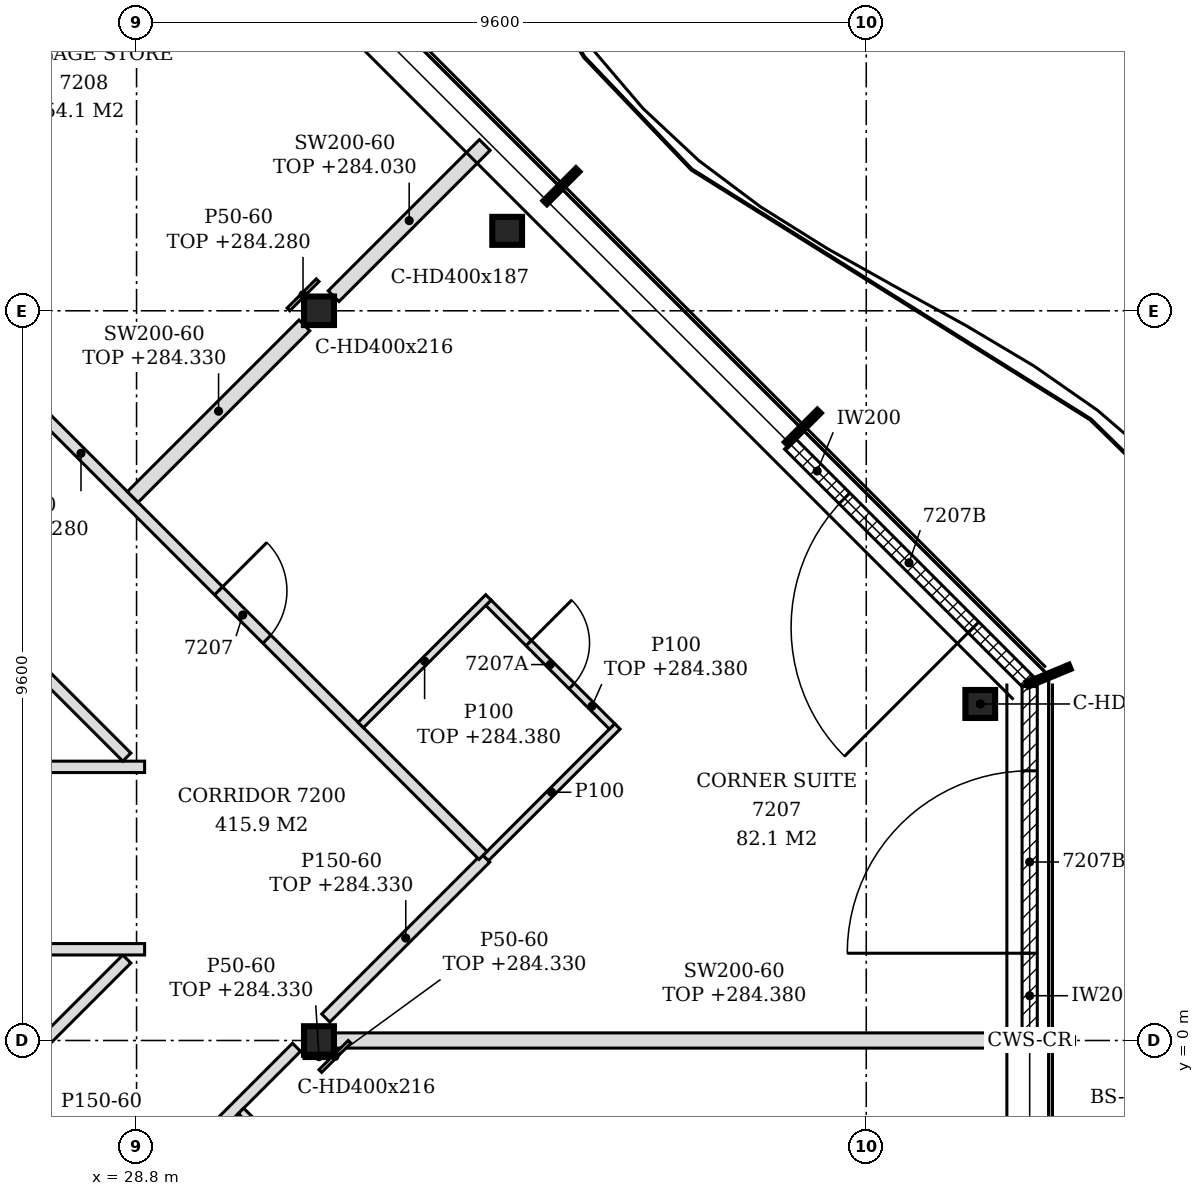
"""IFC4 building model, lengths in metres.
Left out: names, types, materials, properties, quantities, classifications, styles, units other than length and angle.
Written with IfcOpenShell. Run it as: python <this file> out.ifc"""

import sys

from ifc_helpers import new_model, si_unit, direction, frame, frame_2d, origin, origin_2d, place, context, subcontext, project, spatial, polyline, rectangle, i_section, outline, extrude, element, fill, save


model = new_model("IFC4")
c1 = context("Model", 3, precision=1e-05, world=origin(), true_north=direction((0.0, 1.0)))
c2 = subcontext(c1, "Body", "Model", "MODEL_VIEW")
j1 = project(units=[si_unit("LENGTHUNIT", "METRE"), si_unit("PLANEANGLEUNIT", "RADIAN")], contexts=[c1])
p1 = place(None, origin())
s1 = spatial("IfcSite", under=j1, at=p1, CompositionType="ELEMENT")
p2 = place(p1, origin())
s2 = spatial("IfcBuilding", under=s1, at=p2, CompositionType="ELEMENT")
p3 = place(p2, frame((0.0, 0.0, 281.4)))
s3 = spatial("IfcBuildingStorey", under=s2, at=p3, CompositionType="ELEMENT", Elevation=281.4)
for number, where, z_axis, x_axis in (
    (1, (39.9, 4.427, -0.15), (0.0, 0.0, 1.0), (1.0, 0.0, 0.0)),
    (2, (33.676, 10.652, -0.15), (0.0, 0.0, 1.0), (1.0, 0.0, 0.0)),
):
    element("IfcColumn", number, at=place(p3, frame(where, z_axis=z_axis, x_axis=x_axis)), inside=s3, PredefinedType="COLUMN", context=c2, shape_type="SweptSolid", body=[
        extrude(i_section(OverallWidth=0.391, OverallDepth=0.368, WebThickness=0.015, FlangeThickness=0.024, FilletRadius=0.015, at=origin_2d()), origin(), (0.0, 0.0, 1.0), 3.6),
    ])
for number, where, z_axis, x_axis in (
    (3, (31.2, 0.0, -0.15), (0.0, 0.0, 1.0), (1.0, 0.0, 0.0)),
    (4, (31.2, 9.6, -0.15), (0.0, 0.0, 1.0), (1.0, 0.0, 0.0)),
):
    element("IfcColumn", number, at=place(p3, frame(where, z_axis=z_axis, x_axis=x_axis)), inside=s3, PredefinedType="COLUMN", context=c2, shape_type="SweptSolid", body=[
        extrude(i_section(OverallWidth=0.394, OverallDepth=0.375, WebThickness=0.017, FlangeThickness=0.028, FilletRadius=0.015, at=origin_2d()), origin(), (0.0, 0.0, 1.0), 3.6),
    ])
p4 = place(p3, frame((40.55, 0.03, 0.0), z_axis=(0.0, 0.0, 1.0), x_axis=(0.0, 1.0, 0.0)))
e5 = element("IfcWall", 5, at=p4, inside=s3, PredefinedType="NOTDEFINED", context=c2, shape_type="SweptSolid", body=[
    extrude(rectangle(XDim=4.626, YDim=0.2, at=frame_2d((2.313, 0.0))), origin(), (0.0, 0.0, 1.0), 3.45),
])
p5 = place(p4, frame((1.118, 0.0, 0.0)))
e6 = element("IfcOpeningElement", 6, at=p5, cuts=e5, PredefinedType="OPENING", context=c2, shape_type="SweptSolid", body=[
    extrude(rectangle(XDim=2.4, YDim=2.4, at=frame_2d((1.2, 1.2))), frame((0.0, 0.11, 0.0), z_axis=(0.0, -1.0, 0.0), x_axis=(1.0, 0.0, 0.0)), (0.0, 0.0, 1.0), 0.22),
])
p6 = place(p3, frame((40.522, 4.725, 0.0), z_axis=(0.0, 0.0, 1.0), x_axis=(-0.707106781187, 0.707106781187, 0.0)))
e7 = element("IfcWall", 7, at=p6, inside=s3, PredefinedType="NOTDEFINED", context=c2, shape_type="SweptSolid", body=[
    extrude(rectangle(XDim=4.421, YDim=0.2, at=frame_2d((2.21, 0.0))), origin(), (0.0, 0.0, 1.0), 3.45),
])
p7 = place(p6, frame((1.005, 0.0, 0.0)))
e8 = element("IfcOpeningElement", 8, at=p7, cuts=e7, PredefinedType="OPENING", context=c2, shape_type="SweptSolid", body=[
    extrude(rectangle(XDim=2.4, YDim=2.4, at=frame_2d((1.2, 1.2))), frame((0.0, 0.11, 0.0), z_axis=(0.0, -1.0, 0.0), x_axis=(1.0, 0.0, 0.0)), (0.0, 0.0, 1.0), 0.22),
])
p8 = place(p3, frame((14.322, -16.672, 0.0), z_axis=(0.0, 0.0, 1.0), x_axis=(0.707106781187, 0.707106781187, 0.0)))
e9 = element("IfcWall", 9, at=p8, inside=s3, PredefinedType="PARTITIONING", context=c2, shape_type="SweptSolid", body=[
    extrude(rectangle(XDim=23.452, YDim=0.15, at=frame_2d((11.726, 0.0))), origin(), (0.0, 0.0, 1.0), 2.73),
])
p9 = place(p8, frame((0.775, 0.0, 0.0)))
e10 = element("IfcOpeningElement", 10, at=p9, cuts=e9, PredefinedType="OPENING", context=c2, shape_type="SweptSolid", body=[
    extrude(rectangle(XDim=0.9, YDim=2.1, at=frame_2d((0.45, 1.05))), frame((0.0, 0.085, 0.0), z_axis=(0.0, -1.0, 0.0), x_axis=(1.0, 0.0, 0.0)), (0.0, 0.0, 1.0), 0.17),
])
p10 = place(p8, frame((6.489, 0.0, 0.0)))
e11 = element("IfcOpeningElement", 11, at=p10, cuts=e9, PredefinedType="OPENING", context=c2, shape_type="SweptSolid", body=[
    extrude(rectangle(XDim=0.9, YDim=2.1, at=frame_2d((0.45, 1.05))), frame((0.0, 0.085, 0.0), z_axis=(0.0, -1.0, 0.0), x_axis=(1.0, 0.0, 0.0)), (0.0, 0.0, 1.0), 0.17),
])
p11 = place(p8, frame((10.89, 0.0, 0.0)))
e12 = element("IfcOpeningElement", 12, at=p11, cuts=e9, PredefinedType="OPENING", context=c2, shape_type="SweptSolid", body=[
    extrude(rectangle(XDim=0.9, YDim=2.1, at=frame_2d((0.45, 1.05))), frame((0.0, 0.085, 0.0), z_axis=(0.0, -1.0, 0.0), x_axis=(1.0, 0.0, 0.0)), (0.0, 0.0, 1.0), 0.17),
])
p12 = place(p8, frame((14.788, 0.0, 0.0)))
e13 = element("IfcOpeningElement", 13, at=p12, cuts=e9, PredefinedType="OPENING", context=c2, shape_type="SweptSolid", body=[
    extrude(rectangle(XDim=0.9, YDim=2.1, at=frame_2d((0.45, 1.05))), frame((0.0, 0.085, 0.0), z_axis=(0.0, -1.0, 0.0), x_axis=(1.0, 0.0, 0.0)), (0.0, 0.0, 1.0), 0.17),
])
p13 = place(p8, frame((17.689, 0.0, 0.0)))
e14 = element("IfcOpeningElement", 14, at=p13, cuts=e9, PredefinedType="OPENING", context=c2, shape_type="SweptSolid", body=[
    extrude(rectangle(XDim=0.9, YDim=2.1, at=frame_2d((0.45, 1.05))), frame((0.0, 0.085, 0.0), z_axis=(0.0, -1.0, 0.0), x_axis=(1.0, 0.0, 0.0)), (0.0, 0.0, 1.0), 0.17),
])
p14 = place(p3, frame((19.392, -8.208, 0.0), z_axis=(0.0, 0.0, 1.0), x_axis=(0.707106781187, 0.707106781187, 0.0)))
e15 = element("IfcWall", 15, at=p14, inside=s3, PredefinedType="PARTITIONING", context=c2, shape_type="SweptSolid", body=[
    extrude(rectangle(XDim=13.124, YDim=0.15, at=frame_2d((6.562, 0.0))), origin(), (0.0, 0.0, 1.0), 2.88),
])
p15 = place(p14, frame((6.066, 0.0, 0.0)))
e16 = element("IfcOpeningElement", 16, at=p15, cuts=e15, PredefinedType="OPENING", context=c2, shape_type="SweptSolid", body=[
    extrude(rectangle(XDim=0.9, YDim=2.1, at=frame_2d((0.45, 1.05))), frame((0.0, 0.085, 0.0), z_axis=(0.0, -1.0, 0.0), x_axis=(1.0, 0.0, 0.0)), (0.0, 0.0, 1.0), 0.17),
])
p16 = place(p3, frame((37.155, -7.907, 0.0), z_axis=(0.0, 0.0, 1.0), x_axis=(-0.707106781187, 0.707106781187, 0.0)))
e17 = element("IfcWall", 17, at=p16, inside=s3, PredefinedType="PARTITIONING", context=c2, shape_type="SweptSolid", body=[
    extrude(rectangle(XDim=9.873, YDim=0.1, at=frame_2d((4.937, 0.0))), origin(), (0.0, 0.0, 1.0), 2.93),
])
p17 = place(p16, frame((3.134, 0.0, 0.0)))
e18 = element("IfcOpeningElement", 18, at=p17, cuts=e17, PredefinedType="OPENING", context=c2, shape_type="SweptSolid", body=[
    extrude(rectangle(XDim=0.9, YDim=2.1, at=frame_2d((0.45, 1.05))), frame((0.0, 0.06, 0.0), z_axis=(0.0, -1.0, 0.0), x_axis=(1.0, 0.0, 0.0)), (0.0, 0.0, 1.0), 0.12),
])
p18 = place(p3, frame((31.397, 0.0, 0.0), z_axis=(0.0, 0.0, 1.0), x_axis=(1.0, 0.0, 0.0)))
e19 = element("IfcWall", 19, at=p18, inside=s3, PredefinedType="PARTITIONING", context=c2, shape_type="SweptSolid", body=[
    extrude(outline(polyline([(0.0, 0.0), (9.053, 0.0), (9.053, 2.98), (8.653, 2.98), (8.651, 2.93), (8.353, 2.93), (8.351, 2.98), (0.0, 2.98), (0.0, 0.0)])), frame((0.0, 0.1, 0.0), z_axis=(0.0, -1.0, 0.0), x_axis=(1.0, 0.0, 0.0)), (0.0, 0.0, 1.0), 0.2),
])
p19 = place(p3, frame((31.289, 0.295, 0.0), z_axis=(0.0, 0.0, 1.0), x_axis=(0.707147793093, 0.707065766902, 0.0)))
e20 = element("IfcWall", 20, at=p19, inside=s3, PredefinedType="PARTITIONING", context=c2, shape_type="SweptSolid", body=[
    extrude(rectangle(XDim=2.976, YDim=0.15, at=frame_2d((1.488, 0.0))), origin(), (0.0, 0.0, 1.0), 2.93),
])
p20 = place(p3, frame((19.125, 1.2, 0.0), z_axis=(0.0, 0.0, 1.0), x_axis=(1.0, 0.0, 0.0)))
e21 = element("IfcWall", 21, at=p20, inside=s3, PredefinedType="PARTITIONING", context=c2, shape_type="SweptSolid", body=[
    extrude(outline(polyline([(0.0, 0.0), (9.781, 0.0), (9.781, 3.45), (0.225, 3.45), (0.223, 2.83), (0.0, 2.83), (0.0, 0.0)])), frame((0.0, 0.075, 0.0), z_axis=(0.0, -1.0, 0.0), x_axis=(1.0, 0.0, 0.0)), (0.0, 0.0, 1.0), 0.15),
])
p21 = place(p3, frame((33.394, 2.4, 0.0), z_axis=(0.0, 0.0, 1.0), x_axis=(0.707056951598, 0.707156607264, 0.0)))
e22 = element("IfcWall", 22, at=p21, inside=s3, PredefinedType="PARTITIONING", context=c2, shape_type="SweptSolid", body=[
    extrude(rectangle(XDim=2.45, YDim=0.1, at=frame_2d((1.225, 0.0))), origin(), (0.0, 0.0, 1.0), 3.45),
])
p22 = place(p3, frame((33.359, 2.435, 0.0), z_axis=(0.0, 0.0, 1.0), x_axis=(-0.707098666068, 0.707114896212, 0.0)))
e23 = element("IfcWall", 23, at=p22, inside=s3, PredefinedType="PARTITIONING", context=c2, shape_type="SweptSolid", body=[
    extrude(rectangle(XDim=15.042, YDim=0.15, at=frame_2d((7.521, 0.0))), origin(), (0.0, 0.0, 1.0), 2.88),
])
p23 = place(p22, frame((4.021, 0.0, 0.0)))
e24 = element("IfcOpeningElement", 24, at=p23, cuts=e23, PredefinedType="OPENING", context=c2, shape_type="SweptSolid", body=[
    extrude(rectangle(XDim=0.9, YDim=2.1, at=frame_2d((0.45, 1.05))), frame((0.0, 0.085, 0.0), z_axis=(0.0, -1.0, 0.0), x_axis=(1.0, 0.0, 0.0)), (0.0, 0.0, 1.0), 0.17),
])
p24 = place(p22, frame((10.04, 0.0, 0.0)))
e25 = element("IfcOpeningElement", 25, at=p24, cuts=e23, PredefinedType="OPENING", context=c2, shape_type="SweptSolid", body=[
    extrude(rectangle(XDim=0.9, YDim=2.1, at=frame_2d((0.45, 1.05))), frame((0.0, 0.085, 0.0), z_axis=(0.0, -1.0, 0.0), x_axis=(1.0, 0.0, 0.0)), (0.0, 0.0, 1.0), 0.17),
])
p25 = place(p3, frame((19.125, 3.6, 0.0), z_axis=(0.0, 0.0, 1.0), x_axis=(1.0, 0.0, 0.0)))
e26 = element("IfcWall", 26, at=p25, inside=s3, PredefinedType="PARTITIONING", context=c2, shape_type="SweptSolid", body=[
    extrude(outline(polyline([(0.0, 0.0), (9.781, 0.0), (9.781, 3.45), (0.225, 3.45), (0.223, 2.83), (0.0, 2.83), (0.0, 0.0)])), frame((0.0, 0.075, 0.0), z_axis=(0.0, -1.0, 0.0), x_axis=(1.0, 0.0, 0.0)), (0.0, 0.0, 1.0), 0.15),
])
p26 = place(p3, frame((28.672, 3.728, 0.0), z_axis=(0.0, 0.0, 1.0), x_axis=(-0.707106781187, 0.707106781187, 0.0)))
e27 = element("IfcWall", 27, at=p26, inside=s3, PredefinedType="PARTITIONING", context=c2, shape_type="SweptSolid", body=[
    extrude(rectangle(XDim=13.124, YDim=0.15, at=frame_2d((6.562, 0.0))), origin(), (0.0, 0.0, 1.0), 2.88),
])
p27 = place(p26, frame((6.157, 0.0, 0.0)))
e28 = element("IfcOpeningElement", 28, at=p27, cuts=e27, PredefinedType="OPENING", context=c2, shape_type="SweptSolid", body=[
    extrude(rectangle(XDim=0.9, YDim=2.1, at=frame_2d((0.45, 1.05))), frame((0.0, 0.085, 0.0), z_axis=(0.0, -1.0, 0.0), x_axis=(1.0, 0.0, 0.0)), (0.0, 0.0, 1.0), 0.17),
])
p28 = place(p3, frame((35.056, 4.132, 0.0), z_axis=(0.0, 0.0, 1.0), x_axis=(-0.707106781187, 0.707106781187, 0.0)))
e29 = element("IfcWall", 29, at=p28, inside=s3, PredefinedType="PARTITIONING", context=c2, shape_type="SweptSolid", body=[
    extrude(rectangle(XDim=2.3, YDim=0.1, at=frame_2d((1.15, 0.0))), origin(), (0.0, 0.0, 1.0), 2.98),
])
p29 = place(p28, frame((0.75, 0.0, 0.0)))
e30 = element("IfcOpeningElement", 30, at=p29, cuts=e29, PredefinedType="OPENING", context=c2, shape_type="SweptSolid", body=[
    extrude(rectangle(XDim=0.8, YDim=2.1, at=frame_2d((0.4, 1.05))), frame((0.0, 0.06, 0.0), z_axis=(0.0, -1.0, 0.0), x_axis=(1.0, 0.0, 0.0)), (0.0, 0.0, 1.0), 0.12),
])
p30 = place(p3, frame((31.75, 4.15, 0.0), z_axis=(0.0, 0.0, 1.0), x_axis=(0.707055379538, 0.707158179099, 0.0)))
e31 = element("IfcWall", 31, at=p30, inside=s3, PredefinedType="PARTITIONING", context=c2, shape_type="SweptSolid", body=[
    extrude(rectangle(XDim=2.375, YDim=0.1, at=frame_2d((1.188, 0.0))), origin(), (0.0, 0.0, 1.0), 2.98),
])
p31 = place(p3, frame((28.75, 7.15, 0.0), z_axis=(0.0, 0.0, 1.0), x_axis=(0.707106781187, 0.707106781187, 0.0)))
e32 = element("IfcWall", 32, at=p31, inside=s3, PredefinedType="PARTITIONING", context=c2, shape_type="SweptSolid", body=[
    extrude(rectangle(XDim=3.193, YDim=0.2, at=frame_2d((1.597, 0.0))), origin(), (0.0, 0.0, 1.0), 2.93),
])
p32 = place(p3, frame((31.392, 9.792, 0.0), z_axis=(0.0, 0.0, 1.0), x_axis=(0.707106781187, 0.707106781187, 0.0)))
e33 = element("IfcWall", 33, at=p32, inside=s3, PredefinedType="PARTITIONING", context=c2, shape_type="SweptSolid", body=[
    extrude(rectangle(XDim=2.812, YDim=0.2, at=frame_2d((1.406, 0.0))), origin(), (0.0, 0.0, 1.0), 2.63),
])
p33 = place(p3, frame((31.218, -0.402, 0.0), z_axis=(0.0, 0.0, 1.0), x_axis=(0.707106781187, 0.707106781187, 0.0)))
e34 = element("IfcWall", 34, at=p33, inside=s3, PredefinedType="PARTITIONING", context=c2, shape_type="SweptSolid", body=[
    extrude(rectangle(XDim=0.544, YDim=0.05, at=frame_2d((0.272, 0.0))), origin(), (0.0, 0.0, 1.0), 2.93),
])
p34 = place(p3, frame((31.003, -0.212, 0.0), z_axis=(0.0, 0.0, 1.0), x_axis=(1.0, 0.0, 0.0)))
e35 = element("IfcWall", 35, at=p34, inside=s3, PredefinedType="PARTITIONING", context=c2, shape_type="SweptSolid", body=[
    extrude(rectangle(XDim=0.394, YDim=0.05, at=frame_2d((0.197, 0.0))), origin(), (0.0, 0.0, 1.0), 2.93),
])
p35 = place(p3, frame((30.798, 9.618, 0.0), z_axis=(0.0, 0.0, 1.0), x_axis=(0.707106781187, 0.707106781187, 0.0)))
e36 = element("IfcWall", 36, at=p35, inside=s3, PredefinedType="PARTITIONING", context=c2, shape_type="SweptSolid", body=[
    extrude(rectangle(XDim=0.544, YDim=0.05, at=frame_2d((0.272, 0.0))), origin(), (0.0, 0.0, 1.0), 2.88),
])
p36 = place(p5, origin())
e37 = element("IfcDoor", 37, at=p36, inside=s3, OperationType="SINGLE_SWING_LEFT", PredefinedType="DOOR", context=c2, shape_type="SweptSolid", body=[
    extrude(rectangle(XDim=2.4, YDim=2.4, at=frame_2d((1.2, 1.2))), frame((0.0, 0.025, 0.0), z_axis=(0.0, -1.0, 0.0), x_axis=(1.0, 0.0, 0.0)), (0.0, 0.0, 1.0), 0.05),
])
fill(e6, e37)
p37 = place(p7, origin())
e38 = element("IfcDoor", 38, at=p37, inside=s3, OperationType="SINGLE_SWING_LEFT", PredefinedType="DOOR", context=c2, shape_type="SweptSolid", body=[
    extrude(rectangle(XDim=2.4, YDim=2.4, at=frame_2d((1.2, 1.2))), frame((0.0, 0.025, 0.0), z_axis=(0.0, -1.0, 0.0), x_axis=(1.0, 0.0, 0.0)), (0.0, 0.0, 1.0), 0.05),
])
fill(e8, e38)
p38 = place(p23, frame((0.9, 0.0, 0.0), z_axis=(0.0, 0.0, 1.0), x_axis=(-1.0, 0.0, 0.0)))
e39 = element("IfcDoor", 39, at=p38, inside=s3, OperationType="SINGLE_SWING_LEFT", PredefinedType="DOOR", context=c2, shape_type="SweptSolid", body=[
    extrude(rectangle(XDim=0.9, YDim=2.1, at=frame_2d((0.45, 1.05))), frame((0.0, 0.025, 0.0), z_axis=(0.0, -1.0, 0.0), x_axis=(1.0, 0.0, 0.0)), (0.0, 0.0, 1.0), 0.05),
])
fill(e24, e39)
p39 = place(p29, frame((0.8, 0.0, 0.0), z_axis=(0.0, 0.0, 1.0), x_axis=(-1.0, 0.0, 0.0)))
e40 = element("IfcDoor", 40, at=p39, inside=s3, OperationType="SINGLE_SWING_LEFT", PredefinedType="DOOR", context=c2, shape_type="SweptSolid", body=[
    extrude(rectangle(XDim=0.8, YDim=2.1, at=frame_2d((0.4, 1.05))), frame((0.0, 0.025, 0.0), z_axis=(0.0, -1.0, 0.0), x_axis=(1.0, 0.0, 0.0)), (0.0, 0.0, 1.0), 0.05),
])
fill(e30, e40)
save(model, sys.argv[1])
